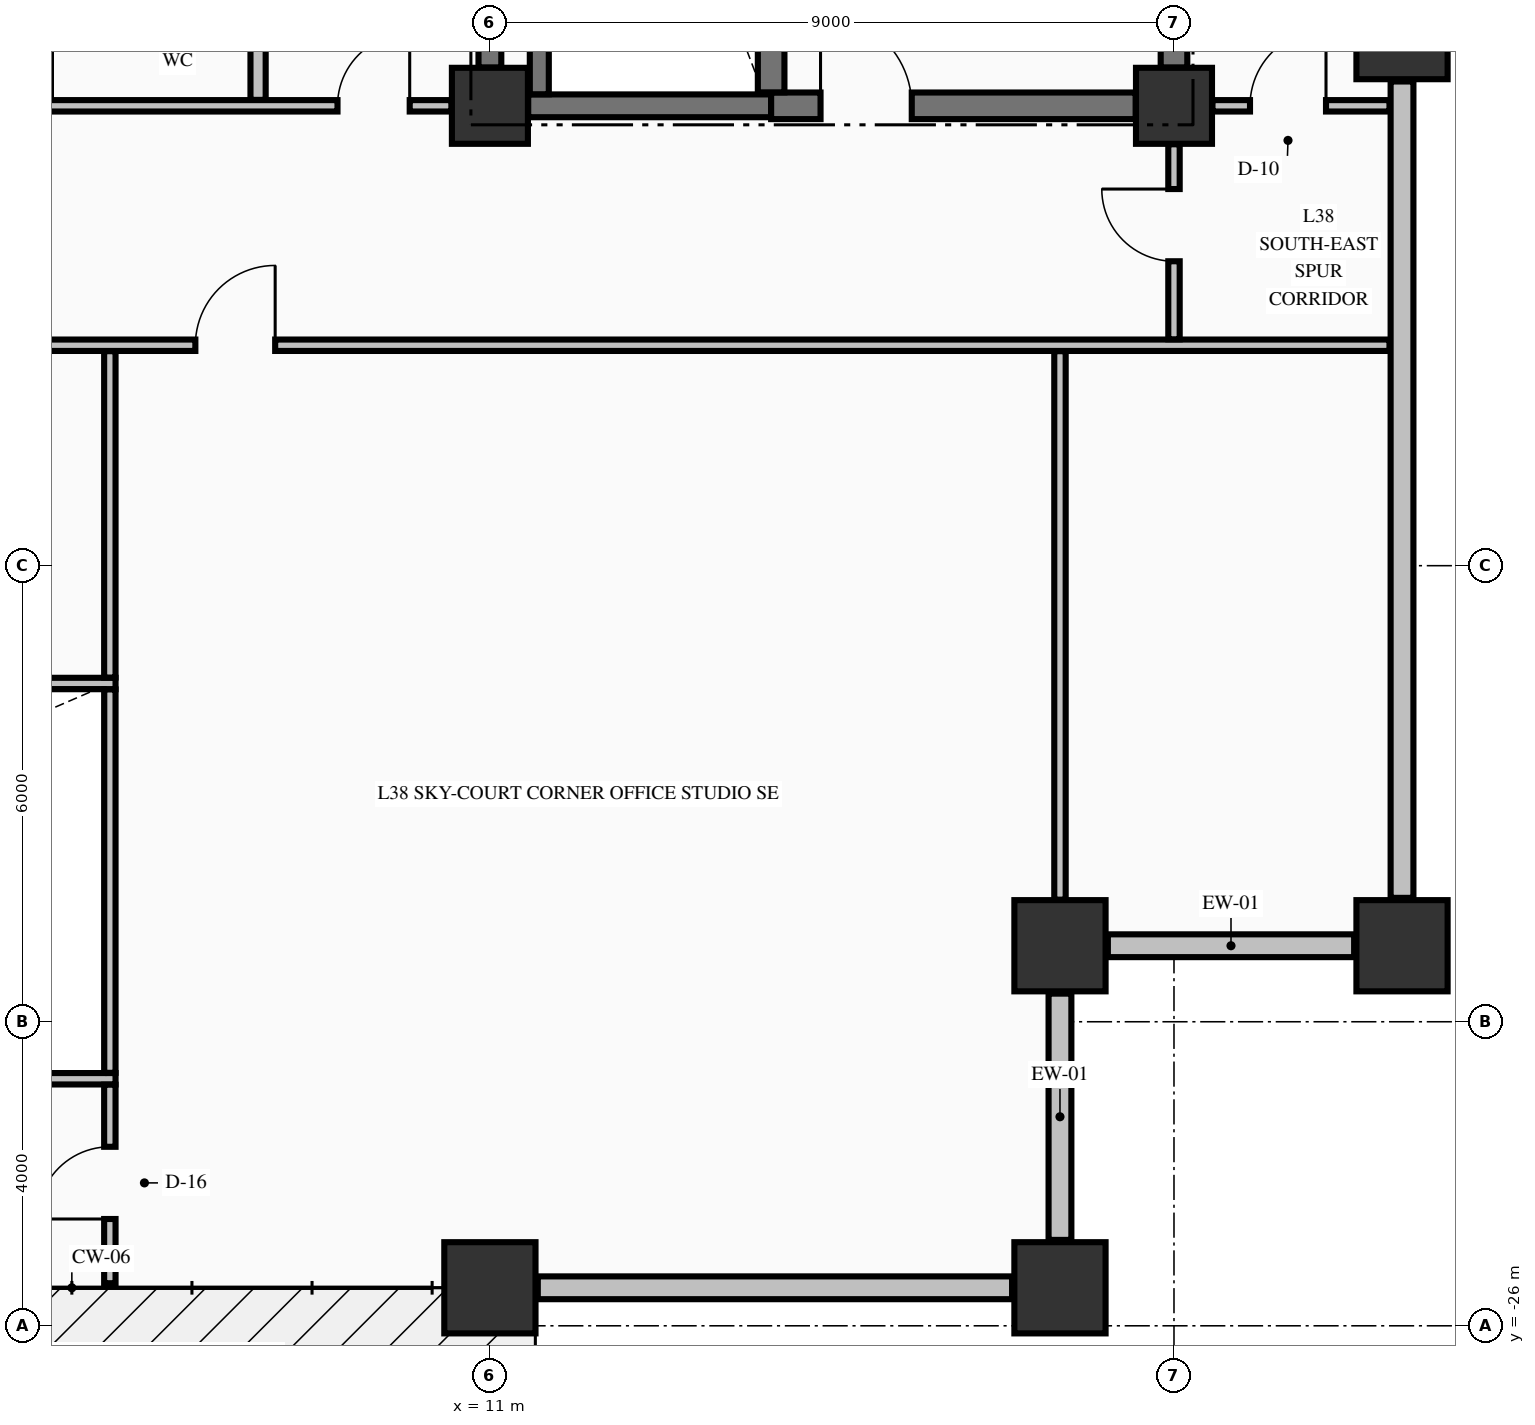
"""IFC4 building model, lengths in metres.
Left out: names, types, materials, properties, quantities, classifications, styles, units other than length and angle.
Written with IfcOpenShell. Run it as: python <this file> out.ifc"""

import sys

from ifc_helpers import new_model, si_unit, direction, frame, frame_2d, origin, origin_2d, place, context, subcontext, project, spatial, rectangle, extrude, element, fill, save


model = new_model("IFC4")
c1 = context("Model", 3, precision=1e-05, world=origin(), true_north=direction((0.0, 1.0)))
c2 = subcontext(c1, "Body", "Model", "MODEL_VIEW")
j1 = project(units=[si_unit("LENGTHUNIT", "METRE"), si_unit("PLANEANGLEUNIT", "RADIAN")], contexts=[c1])
p1 = place(None, origin())
s1 = spatial("IfcSite", under=j1, at=p1, CompositionType="ELEMENT")
p2 = place(p1, origin())
s2 = spatial("IfcBuilding", under=s1, at=p2, CompositionType="ELEMENT")
p3 = place(p2, frame((0.0, 0.0, 149.91)))
s3 = spatial("IfcBuildingStorey", under=s2, at=p3, CompositionType="ELEMENT", Elevation=149.91)
for number, where, z_axis, x_axis in (
    (1, (11.0, -25.5, -0.25), (0.0, 0.0, 1.0), (1.0, 0.0, 0.0)),
    (2, (18.5, -25.5, -0.25), (0.0, 0.0, 1.0), (1.0, 0.0, 0.0)),
    (3, (23.0, -21.0, -0.25), (0.0, 0.0, 1.0), (1.0, 0.0, 0.0)),
    (4, (23.0, -9.0, -0.25), (0.0, 0.0, 1.0), (1.0, 0.0, 0.0)),
    (5, (18.5, -21.0, -0.25), (0.0, 0.0, 1.0), (1.0, 0.0, 0.0)),
):
    element("IfcColumn", number, at=place(p3, frame(where, z_axis=z_axis, x_axis=x_axis)), inside=s3, PredefinedType="COLUMN", context=c2, shape_type="SweptSolid", body=[
        extrude(rectangle(XDim=1.2, YDim=1.2, at=origin_2d()), origin(), (0.0, 0.0, 1.0), 3.395),
    ])
for number, where, z_axis, x_axis in (
    (6, (11.0, -9.95, -0.25), (0.0, 0.0, 1.0), (1.0, 0.0, 0.0)),
    (7, (20.0, -9.95, -0.25), (0.0, 0.0, 1.0), (1.0, 0.0, 0.0)),
):
    element("IfcColumn", number, at=place(p3, frame(where, z_axis=z_axis, x_axis=x_axis)), inside=s3, PredefinedType="COLUMN", context=c2, shape_type="SweptSolid", body=[
        extrude(rectangle(XDim=1.0, YDim=1.0, at=origin_2d()), origin(), (0.0, 0.0, 1.0), 3.395),
    ])
for number, where, z_axis, x_axis in (
    (8, (18.5, -24.87, 0.0), (0.0, 0.0, 1.0), (0.0, 1.0, 0.0)),
    (9, (19.13, -21.0, 0.0), (0.0, 0.0, 1.0), (1.0, 0.0, 0.0)),
):
    element("IfcWall", number, at=place(p3, frame(where, z_axis=z_axis, x_axis=x_axis)), inside=s3, PredefinedType="STANDARD", context=c2, shape_type="SweptSolid", body=[
        extrude(rectangle(XDim=3.24, YDim=0.3, at=frame_2d((1.62, 0.0))), origin(), (0.0, 0.0, 1.0), 2.537),
    ])
p4 = place(p3, frame((11.63, -25.5, 0.0), z_axis=(0.0, 0.0, 1.0), x_axis=(1.0, 0.0, 0.0)))
e10 = element("IfcWall", 10, at=p4, inside=s3, PredefinedType="STANDARD", context=c2, shape_type="SweptSolid", body=[
    extrude(rectangle(XDim=6.24, YDim=0.3, at=frame_2d((3.12, 0.0))), origin(), (0.0, 0.0, 1.0), 2.537),
])
p5 = place(p3, frame((23.0, -20.37, 0.0), z_axis=(0.0, 0.0, 1.0), x_axis=(0.0, 1.0, 0.0)))
e11 = element("IfcWall", 11, at=p5, inside=s3, PredefinedType="STANDARD", context=c2, shape_type="SweptSolid", body=[
    extrude(rectangle(XDim=10.74, YDim=0.3, at=frame_2d((5.37, 0.0))), origin(), (0.0, 0.0, 1.0), 2.537),
])
p6 = place(p3, frame((11.504, -9.95, 0.0), z_axis=(0.0, 0.0, 1.0), x_axis=(1.0, 0.0, 0.0)))
e12 = element("IfcWall", 12, at=p6, inside=s3, PredefinedType="SHEAR", context=c2, shape_type="SweptSolid", body=[
    extrude(rectangle(XDim=3.196, YDim=0.3, at=frame_2d((1.598, 0.0))), origin(), (0.0, 0.0, 1.0), 3.145),
])
p7 = place(p3, frame((14.7, -9.95, 0.0), z_axis=(0.0, 0.0, 1.0), x_axis=(1.0, 0.0, 0.0)))
e13 = element("IfcWall", 13, at=p7, inside=s3, PredefinedType="SHEAR", context=c2, shape_type="SweptSolid", body=[
    extrude(rectangle(XDim=4.796, YDim=0.35, at=frame_2d((2.398, 0.0))), origin(), (0.0, 0.0, 1.0), 3.145),
])
p8 = place(p7, frame((0.65, 0.0, 0.0)))
e14 = element("IfcOpeningElement", 14, at=p8, cuts=e13, PredefinedType="OPENING", context=c2, shape_type="SweptSolid", body=[
    extrude(rectangle(XDim=1.2, YDim=2.15, at=frame_2d((0.6, 1.075))), frame((0.0, 0.185, 0.0), z_axis=(0.0, -1.0, 0.0), x_axis=(1.0, 0.0, 0.0)), (0.0, 0.0, 1.0), 0.37),
])
for number, where, z_axis, x_axis in (
    (15, (-6.075, -22.75, 0.0), (0.0, 0.0, 1.0), (1.0, 0.0, 0.0)),
    (16, (-6.075, -17.55, 0.0), (0.0, 0.0, 1.0), (1.0, 0.0, 0.0)),
):
    element("IfcWall", number, at=place(p3, frame(where, z_axis=z_axis, x_axis=x_axis)), inside=s3, PredefinedType="PARTITIONING", context=c2, shape_type="SweptSolid", body=[
        extrude(rectangle(XDim=12.15, YDim=0.15, at=frame_2d((6.075, 0.0))), origin(), (0.0, 0.0, 1.0), 3.145),
    ])
p9 = place(p3, frame((-27.835, -13.1, 0.0), z_axis=(0.0, 0.0, 1.0), x_axis=(1.0, 0.0, 0.0)))
e17 = element("IfcWall", 17, at=p9, inside=s3, PredefinedType="PARTITIONING", context=c2, shape_type="SweptSolid", body=[
    extrude(rectangle(XDim=50.67, YDim=0.15, at=frame_2d((25.335, 0.0))), origin(), (0.0, 0.0, 1.0), 3.145),
])
p10 = place(p9, frame((29.685, 0.0, 0.0)))
e18 = element("IfcOpeningElement", 18, at=p10, cuts=e17, PredefinedType="OPENING", context=c2, shape_type="SweptSolid", body=[
    extrude(rectangle(XDim=1.1, YDim=2.15, at=frame_2d((0.55, 1.075))), frame((0.0, 0.085, 0.0), z_axis=(0.0, -1.0, 0.0), x_axis=(1.0, 0.0, 0.0)), (0.0, 0.0, 1.0), 0.17),
])
p11 = place(p9, frame((14.41, 0.0, 0.0)))
e19 = element("IfcOpeningElement", 19, at=p11, cuts=e17, PredefinedType="OPENING", context=c2, shape_type="SweptSolid", body=[
    extrude(rectangle(XDim=1.05, YDim=2.15, at=frame_2d((0.525, 1.075))), frame((0.0, 0.085, 0.0), z_axis=(0.0, -1.0, 0.0), x_axis=(1.0, 0.0, 0.0)), (0.0, 0.0, 1.0), 0.17),
])
p12 = place(p9, frame((34.96, 0.0, 0.0)))
e20 = element("IfcOpeningElement", 20, at=p12, cuts=e17, PredefinedType="OPENING", context=c2, shape_type="SweptSolid", body=[
    extrude(rectangle(XDim=1.05, YDim=2.15, at=frame_2d((0.525, 1.075))), frame((0.0, 0.085, 0.0), z_axis=(0.0, -1.0, 0.0), x_axis=(1.0, 0.0, 0.0)), (0.0, 0.0, 1.0), 0.17),
])
p13 = place(p3, frame((-10.494, -9.95, 0.0), z_axis=(0.0, 0.0, 1.0), x_axis=(1.0, 0.0, 0.0)))
e21 = element("IfcWall", 21, at=p13, inside=s3, PredefinedType="PARTITIONING", context=c2, shape_type="SweptSolid", body=[
    extrude(rectangle(XDim=20.988, YDim=0.15, at=frame_2d((10.494, 0.0))), origin(), (0.0, 0.0, 1.0), 3.145),
])
p14 = place(p13, frame((13.994, 0.0, 0.0)))
e22 = element("IfcOpeningElement", 22, at=p14, cuts=e21, PredefinedType="OPENING", context=c2, shape_type="SweptSolid", body=[
    extrude(rectangle(XDim=1.1, YDim=2.15, at=frame_2d((0.55, 1.075))), frame((0.0, 0.085, 0.0), z_axis=(0.0, -1.0, 0.0), x_axis=(1.0, 0.0, 0.0)), (0.0, 0.0, 1.0), 0.17),
])
p15 = place(p13, frame((19.489, 0.0, 0.0)))
e23 = element("IfcOpeningElement", 23, at=p15, cuts=e21, PredefinedType="OPENING", context=c2, shape_type="SweptSolid", body=[
    extrude(rectangle(XDim=0.95, YDim=2.15, at=frame_2d((0.475, 1.075))), frame((0.0, 0.085, 0.0), z_axis=(0.0, -1.0, 0.0), x_axis=(1.0, 0.0, 0.0)), (0.0, 0.0, 1.0), 0.17),
])
p16 = place(p3, frame((20.506, -9.95, 0.0), z_axis=(0.0, 0.0, 1.0), x_axis=(1.0, 0.0, 0.0)))
e24 = element("IfcWall", 24, at=p16, inside=s3, PredefinedType="PARTITIONING", context=c2, shape_type="SweptSolid", body=[
    extrude(rectangle(XDim=2.329, YDim=0.15, at=frame_2d((1.165, 0.0))), origin(), (0.0, 0.0, 1.0), 3.145),
])
p17 = place(p16, frame((0.494, 0.0, 0.0)))
e25 = element("IfcOpeningElement", 25, at=p17, cuts=e24, PredefinedType="OPENING", context=c2, shape_type="SweptSolid", body=[
    extrude(rectangle(XDim=1.0, YDim=2.15, at=frame_2d((0.5, 1.075))), frame((0.0, 0.085, 0.0), z_axis=(0.0, -1.0, 0.0), x_axis=(1.0, 0.0, 0.0)), (0.0, 0.0, 1.0), 0.17),
])
p18 = place(p3, frame((11.0, -9.446, 0.0), z_axis=(0.0, 0.0, 1.0), x_axis=(0.0, 1.0, 0.0)))
e26 = element("IfcWall", 26, at=p18, inside=s3, PredefinedType="SHEAR", context=c2, shape_type="SweptSolid", body=[
    extrude(rectangle(XDim=8.942, YDim=0.3, at=frame_2d((4.471, 0.0))), origin(), (0.0, 0.0, 1.0), 3.145),
])
p19 = place(p3, frame((11.65, -9.798, 0.0), z_axis=(0.0, 0.0, 1.0), x_axis=(0.0, 1.0, 0.0)))
e27 = element("IfcWall", 27, at=p19, inside=s3, PredefinedType="SOLIDWALL", context=c2, shape_type="SweptSolid", body=[
    extrude(rectangle(XDim=9.396, YDim=0.25, at=frame_2d((4.698, 0.0))), origin(), (0.0, 0.0, 1.0), 3.145),
])
p20 = place(p3, frame((14.7, -9.773, 0.0), z_axis=(0.0, 0.0, 1.0), x_axis=(0.0, 1.0, 0.0)))
e28 = element("IfcWall", 28, at=p20, inside=s3, PredefinedType="SHEAR", context=c2, shape_type="SweptSolid", body=[
    extrude(rectangle(XDim=9.371, YDim=0.35, at=frame_2d((4.686, 0.0))), origin(), (0.0, 0.0, 1.0), 3.145),
])
p21 = place(p3, frame((20.0, -9.446, 0.0), z_axis=(0.0, 0.0, 1.0), x_axis=(0.0, 1.0, 0.0)))
e29 = element("IfcWall", 29, at=p21, inside=s3, PredefinedType="SHEAR", context=c2, shape_type="SweptSolid", body=[
    extrude(rectangle(XDim=2.269, YDim=0.35, at=frame_2d((1.135, 0.0))), origin(), (0.0, 0.0, 1.0), 3.145),
])
p22 = place(p3, frame((6.0, -25.44, 0.0), z_axis=(0.0, 0.0, 1.0), x_axis=(0.0, 1.0, 0.0)))
e30 = element("IfcWall", 30, at=p22, inside=s3, PredefinedType="PARTITIONING", context=c2, shape_type="SweptSolid", body=[
    extrude(rectangle(XDim=2.612, YDim=0.15, at=frame_2d((1.306, 0.0))), origin(), (0.0, 0.0, 1.0), 3.145),
])
p23 = place(p22, frame((0.845, 0.0, 0.0)))
e31 = element("IfcOpeningElement", 31, at=p23, cuts=e30, PredefinedType="OPENING", context=c2, shape_type="SweptSolid", body=[
    extrude(rectangle(XDim=0.95, YDim=2.15, at=frame_2d((0.475, 1.075))), frame((0.0, 0.085, 0.0), z_axis=(0.0, -1.0, 0.0), x_axis=(1.0, 0.0, 0.0)), (0.0, 0.0, 1.0), 0.17),
])
p24 = place(p3, frame((6.0, -22.672, 0.0), z_axis=(0.0, 0.0, 1.0), x_axis=(0.0, 1.0, 0.0)))
e32 = element("IfcWall", 32, at=p24, inside=s3, PredefinedType="PARTITIONING", context=c2, shape_type="SweptSolid", body=[
    extrude(rectangle(XDim=5.044, YDim=0.15, at=frame_2d((2.522, 0.0))), origin(), (0.0, 0.0, 1.0), 3.145),
])
p25 = place(p3, frame((6.0, -17.472, 0.0), z_axis=(0.0, 0.0, 1.0), x_axis=(0.0, 1.0, 0.0)))
e33 = element("IfcWall", 33, at=p25, inside=s3, PredefinedType="PARTITIONING", context=c2, shape_type="SweptSolid", body=[
    extrude(rectangle(XDim=4.294, YDim=0.15, at=frame_2d((2.147, 0.0))), origin(), (0.0, 0.0, 1.0), 3.145),
])
p26 = place(p3, frame((7.95, -9.872, 0.0), z_axis=(0.0, 0.0, 1.0), x_axis=(0.0, 1.0, 0.0)))
e34 = element("IfcWall", 34, at=p26, inside=s3, PredefinedType="PARTITIONING", context=c2, shape_type="SweptSolid", body=[
    extrude(rectangle(XDim=4.919, YDim=0.2, at=frame_2d((2.459, 0.0))), origin(), (0.0, 0.0, 1.0), 3.145),
])
p27 = place(p3, frame((18.5, -20.394, 0.0), z_axis=(0.0, 0.0, 1.0), x_axis=(0.0, 1.0, 0.0)))
e35 = element("IfcWall", 35, at=p27, inside=s3, PredefinedType="PARTITIONING", context=c2, shape_type="SweptSolid", body=[
    extrude(rectangle(XDim=7.216, YDim=0.15, at=frame_2d((3.608, 0.0))), origin(), (0.0, 0.0, 1.0), 3.145),
])
p28 = place(p3, frame((20.0, -13.022, 0.0), z_axis=(0.0, 0.0, 1.0), x_axis=(0.0, 1.0, 0.0)))
e36 = element("IfcWall", 36, at=p28, inside=s3, PredefinedType="PARTITIONING", context=c2, shape_type="SweptSolid", body=[
    extrude(rectangle(XDim=2.566, YDim=0.15, at=frame_2d((1.283, 0.0))), origin(), (0.0, 0.0, 1.0), 2.635),
])
p29 = place(p28, frame((1.027, 0.0, 0.0)))
e37 = element("IfcOpeningElement", 37, at=p29, cuts=e36, PredefinedType="OPENING", context=c2, shape_type="SweptSolid", body=[
    extrude(rectangle(XDim=0.95, YDim=2.15, at=frame_2d((0.475, 1.075))), frame((0.0, 0.085, 0.0), z_axis=(0.0, -1.0, 0.0), x_axis=(1.0, 0.0, 0.0)), (0.0, 0.0, 1.0), 0.17),
])
p30 = place(p8, origin())
e38 = element("IfcDoor", 38, at=p30, inside=s3, OperationType="SINGLE_SWING_LEFT", PredefinedType="DOOR", context=c2, shape_type="SweptSolid", body=[
    extrude(rectangle(XDim=1.2, YDim=2.15, at=frame_2d((0.6, 1.075))), frame((0.0, 0.025, 0.0), z_axis=(0.0, -1.0, 0.0), x_axis=(1.0, 0.0, 0.0)), (0.0, 0.0, 1.0), 0.05),
])
fill(e14, e38)
p31 = place(p23, origin())
e39 = element("IfcDoor", 39, at=p31, inside=s3, OperationType="SINGLE_SWING_LEFT", PredefinedType="DOOR", context=c2, shape_type="SweptSolid", body=[
    extrude(rectangle(XDim=0.95, YDim=2.15, at=frame_2d((0.475, 1.075))), frame((0.0, 0.025, 0.0), z_axis=(0.0, -1.0, 0.0), x_axis=(1.0, 0.0, 0.0)), (0.0, 0.0, 1.0), 0.05),
])
fill(e31, e39)
p32 = place(p12, origin())
e40 = element("IfcDoor", 40, at=p32, inside=s3, OperationType="SINGLE_SWING_RIGHT", PredefinedType="DOOR", context=c2, shape_type="SweptSolid", body=[
    extrude(rectangle(XDim=1.05, YDim=2.15, at=frame_2d((0.525, 1.075))), frame((0.0, 0.025, 0.0), z_axis=(0.0, -1.0, 0.0), x_axis=(1.0, 0.0, 0.0)), (0.0, 0.0, 1.0), 0.05),
])
fill(e20, e40)
p33 = place(p15, origin())
e41 = element("IfcDoor", 41, at=p33, inside=s3, OperationType="SINGLE_SWING_RIGHT", PredefinedType="DOOR", context=c2, shape_type="SweptSolid", body=[
    extrude(rectangle(XDim=0.95, YDim=2.15, at=frame_2d((0.475, 1.075))), frame((0.0, 0.025, 0.0), z_axis=(0.0, -1.0, 0.0), x_axis=(1.0, 0.0, 0.0)), (0.0, 0.0, 1.0), 0.05),
])
fill(e23, e41)
p34 = place(p29, origin())
e42 = element("IfcDoor", 42, at=p34, inside=s3, OperationType="SINGLE_SWING_RIGHT", PredefinedType="DOOR", context=c2, shape_type="SweptSolid", body=[
    extrude(rectangle(XDim=0.95, YDim=2.15, at=frame_2d((0.475, 1.075))), frame((0.0, 0.025, 0.0), z_axis=(0.0, -1.0, 0.0), x_axis=(1.0, 0.0, 0.0)), (0.0, 0.0, 1.0), 0.05),
])
fill(e37, e42)
p35 = place(p17, origin())
e43 = element("IfcDoor", 43, at=p35, inside=s3, OperationType="SINGLE_SWING_RIGHT", PredefinedType="DOOR", context=c2, shape_type="SweptSolid", body=[
    extrude(rectangle(XDim=1.0, YDim=2.15, at=frame_2d((0.5, 1.075))), frame((0.0, 0.025, 0.0), z_axis=(0.0, -1.0, 0.0), x_axis=(1.0, 0.0, 0.0)), (0.0, 0.0, 1.0), 0.05),
])
fill(e25, e43)
save(model, sys.argv[1])
